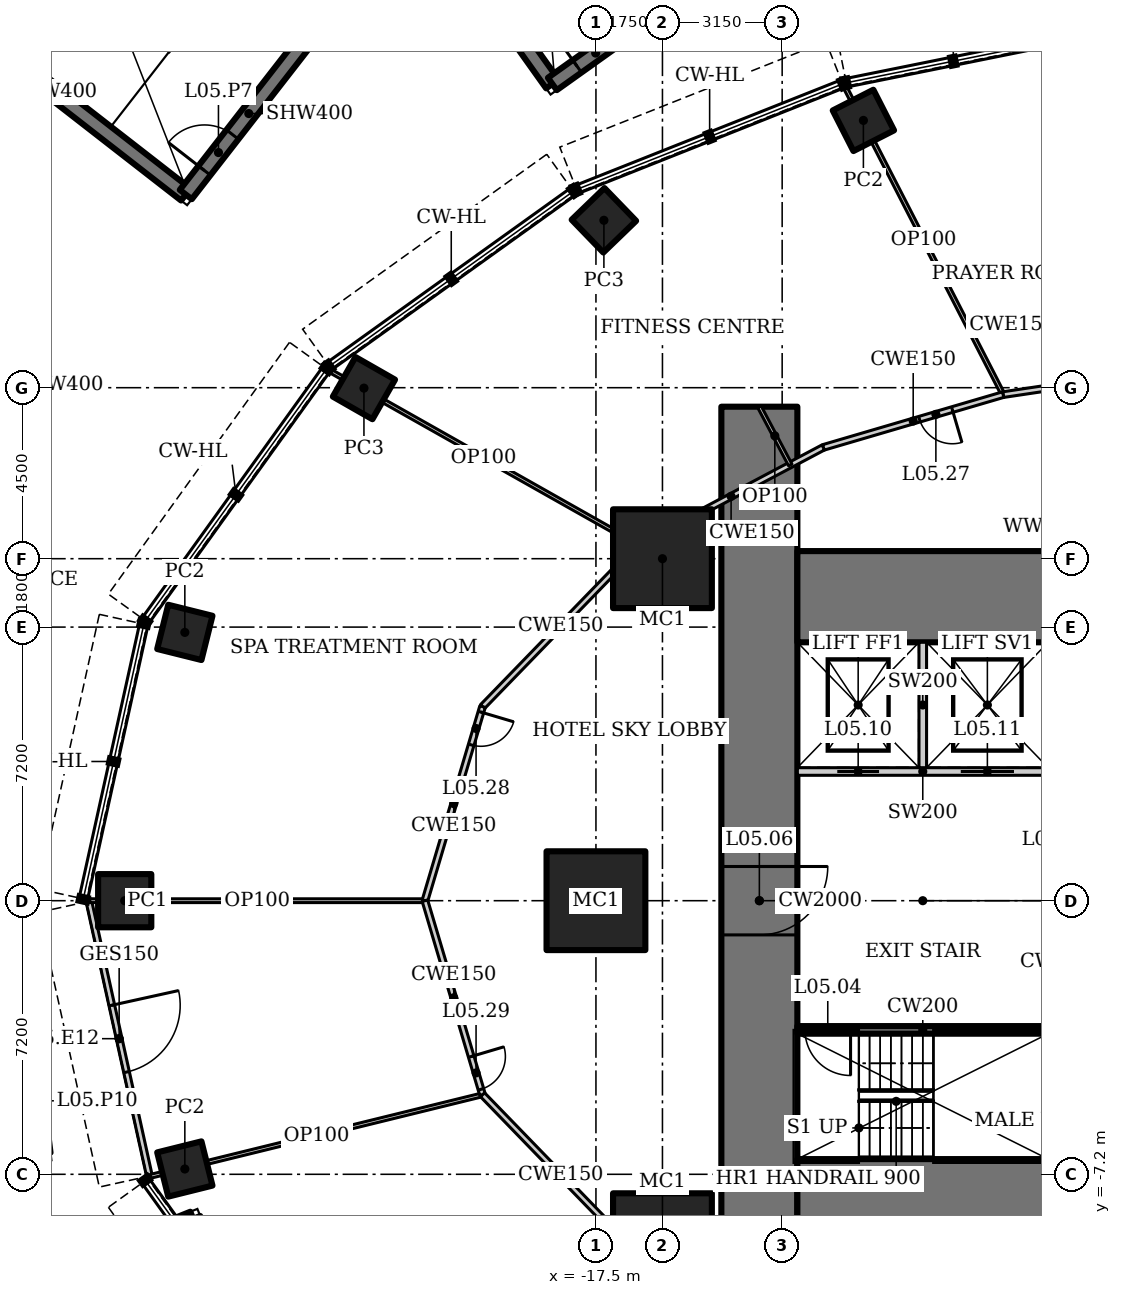
"""IFC4 building model, lengths in metres.
Left out: names, types, materials, properties, quantities, classifications, styles, units other than length and angle.
Written with IfcOpenShell. Run it as: python <this file> out.ifc"""

import sys

from ifc_helpers import new_model, si_unit, direction, frame, frame_2d, origin, origin_2d, place, context, subcontext, project, spatial, rectangle, hollow_rectangle, extrude, element, fill, save


model = new_model("IFC4")
c1 = context("Model", 3, precision=1e-05, world=origin(), true_north=direction((0.0, 1.0)))
c2 = subcontext(c1, "Body", "Model", "MODEL_VIEW")
j1 = project(units=[si_unit("LENGTHUNIT", "METRE"), si_unit("PLANEANGLEUNIT", "RADIAN")], contexts=[c1])
p1 = place(None, origin())
s1 = spatial("IfcSite", under=j1, at=p1, CompositionType="ELEMENT")
p2 = place(p1, origin())
s2 = spatial("IfcBuilding", under=s1, at=p2, CompositionType="ELEMENT")
p3 = place(p2, frame((0.0, 0.0, 32.0)))
s3 = spatial("IfcBuildingStorey", under=s2, at=p3, CompositionType="ELEMENT", Elevation=32.0)
for number, where, z_axis, x_axis in (
    (1, (-15.75, 9.0, 0.0), (0.0, 0.0, 1.0), (1.0, 0.0, 0.0)),
    (2, (-17.5, 0.0, 0.0), (0.0, 0.0, 1.0), (1.0, 0.0, 0.0)),
    (3, (-15.75, -9.0, 0.0), (0.0, 0.0, 1.0), (1.0, 0.0, 0.0)),
):
    element("IfcColumn", number, at=place(p3, frame(where, z_axis=z_axis, x_axis=x_axis)), inside=s3, PredefinedType="COLUMN", context=c2, shape_type="SweptSolid", body=[
        extrude(hollow_rectangle(XDim=2.6, YDim=2.6, WallThickness=0.13, at=origin_2d()), origin(), (0.0, 0.0, 1.0), 5.0),
    ])
p4 = place(p3, frame((-10.463, 20.534, 0.0), z_axis=(0.0, 0.0, 1.0), x_axis=(0.891006524188, 0.45399049974, 0.0)))
e4 = element("IfcColumn", 4, at=p4, inside=s3, PredefinedType="COLUMN", context=c2, shape_type="SweptSolid", body=[
    extrude(hollow_rectangle(XDim=1.2, YDim=1.2, WallThickness=0.1, at=origin_2d()), origin(), (0.0, 0.0, 1.0), 5.0),
])
for number, where, z_axis, x_axis in (
    (5, (-17.291, 17.905, 0.0), (0.0, 0.0, 1.0), (0.719, 0.695, 0.0)),
    (6, (-23.605, 13.489, 0.0), (0.0, 0.0, 1.0), (0.496, 0.868, 0.0)),
):
    element("IfcColumn", number, at=place(p3, frame(where, z_axis=z_axis, x_axis=x_axis)), inside=s3, PredefinedType="COLUMN", context=c2, shape_type="SweptSolid", body=[
        extrude(hollow_rectangle(XDim=1.2, YDim=1.2, WallThickness=0.12, at=origin_2d()), origin(), (0.0, 0.0, 1.0), 5.0),
    ])
p5 = place(p3, frame((-28.318, 7.06, 0.0), z_axis=(0.0, 0.0, 1.0), x_axis=(0.2419218956, 0.970295726276, 0.0)))
e7 = element("IfcColumn", 7, at=p5, inside=s3, PredefinedType="COLUMN", context=c2, shape_type="SweptSolid", body=[
    extrude(hollow_rectangle(XDim=1.2, YDim=1.2, WallThickness=0.1, at=origin_2d()), origin(), (0.0, 0.0, 1.0), 5.0),
])
p6 = place(p3, frame((-29.9, 0.0, 0.0), z_axis=(0.0, 0.0, 1.0), x_axis=(1.0, 0.0, 0.0)))
e8 = element("IfcColumn", 8, at=p6, inside=s3, PredefinedType="COLUMN", context=c2, shape_type="SweptSolid", body=[
    extrude(hollow_rectangle(XDim=1.4, YDim=1.4, WallThickness=0.1, at=origin_2d()), origin(), (0.0, 0.0, 1.0), 5.0),
])
p7 = place(p3, frame((-28.318, -7.06, 0.0), z_axis=(0.0, 0.0, 1.0), x_axis=(0.970295726276, 0.2419218956, 0.0)))
e9 = element("IfcColumn", 9, at=p7, inside=s3, PredefinedType="COLUMN", context=c2, shape_type="SweptSolid", body=[
    extrude(hollow_rectangle(XDim=1.2, YDim=1.2, WallThickness=0.1, at=origin_2d()), origin(), (0.0, 0.0, 1.0), 5.0),
])
p8 = place(p3, frame((-13.2, 13.0, 0.0), z_axis=(0.0, 0.0, 1.0), x_axis=(0.0, -1.0, 0.0)))
e10 = element("IfcWall", 10, at=p8, inside=s3, PredefinedType="SHEAR", context=c2, shape_type="SweptSolid", body=[
    extrude(rectangle(XDim=26.0, YDim=2.0, at=frame_2d((13.0, 0.0))), origin(), (0.0, 0.0, 1.0), 5.0),
])
p9 = place(p8, frame((12.1, 0.0, 0.0)))
e11 = element("IfcOpeningElement", 11, at=p9, cuts=e10, PredefinedType="OPENING", context=c2, shape_type="SweptSolid", body=[
    extrude(rectangle(XDim=1.8, YDim=2.1, at=frame_2d((0.9, 1.05))), frame((0.0, 1.01, 0.0), z_axis=(0.0, -1.0, 0.0), x_axis=(1.0, 0.0, 0.0)), (0.0, 0.0, 1.0), 2.02),
])
for number, where, z_axis, x_axis in (
    (12, (-12.2, -8.0, 0.0), (0.0, 0.0, 1.0), (1.0, 0.0, 0.0)),
    (13, (12.2, 8.0, 0.0), (0.0, 0.0, 1.0), (-1.0, 0.0, 0.0)),
):
    element("IfcWall", number, at=place(p3, frame(where, z_axis=z_axis, x_axis=x_axis)), inside=s3, PredefinedType="SHEAR", context=c2, shape_type="SweptSolid", body=[
        extrude(rectangle(XDim=24.4, YDim=2.4, at=frame_2d((12.2, 0.0))), origin(), (0.0, 0.0, 1.0), 5.0),
    ])
p10 = place(p3, frame((-5.6, -3.4, 0.0), z_axis=(0.0, 0.0, 1.0), x_axis=(-1.0, 0.0, 0.0)))
e14 = element("IfcWall", 14, at=p10, inside=s3, PredefinedType="SHEAR", context=c2, shape_type="SweptSolid", body=[
    extrude(rectangle(XDim=6.6, YDim=0.2, at=frame_2d((3.3, 0.0))), origin(), (0.0, 0.0, 1.0), 5.0),
])
p11 = place(p10, frame((5.2, 0.0, 0.0)))
e15 = element("IfcOpeningElement", 15, at=p11, cuts=e14, PredefinedType="OPENING", context=c2, shape_type="SweptSolid", body=[
    extrude(rectangle(XDim=1.2, YDim=2.1, at=frame_2d((0.6, 1.05))), frame((0.0, 0.11, 0.0), z_axis=(0.0, -1.0, 0.0), x_axis=(1.0, 0.0, 0.0)), (0.0, 0.0, 1.0), 0.22),
])
p12 = place(p3, frame((-12.2, 3.4, 0.0), z_axis=(0.0, 0.0, 1.0), x_axis=(1.0, 0.0, 0.0)))
e16 = element("IfcWall", 16, at=p12, inside=s3, PredefinedType="SOLIDWALL", context=c2, shape_type="SweptSolid", body=[
    extrude(rectangle(XDim=6.6, YDim=0.2, at=frame_2d((3.3, 0.0))), origin(), (0.0, 0.0, 1.0), 5.0),
])
p13 = place(p12, frame((1.05, 0.0, 0.0)))
e17 = element("IfcOpeningElement", 17, at=p13, cuts=e16, PredefinedType="OPENING", context=c2, shape_type="SweptSolid", body=[
    extrude(rectangle(XDim=1.1, YDim=2.2, at=frame_2d((0.55, 1.1))), frame((0.0, 0.11, 0.0), z_axis=(0.0, -1.0, 0.0), x_axis=(1.0, 0.0, 0.0)), (0.0, 0.0, 1.0), 0.22),
])
p14 = place(p12, frame((4.3, 0.0, 0.0)))
e18 = element("IfcOpeningElement", 18, at=p14, cuts=e16, PredefinedType="OPENING", context=c2, shape_type="SweptSolid", body=[
    extrude(rectangle(XDim=1.4, YDim=2.2, at=frame_2d((0.7, 1.1))), frame((0.0, 0.11, 0.0), z_axis=(0.0, -1.0, 0.0), x_axis=(1.0, 0.0, 0.0)), (0.0, 0.0, 1.0), 0.22),
])
p15 = place(p3, frame((-8.9, 3.5, 0.0), z_axis=(0.0, 0.0, 1.0), x_axis=(0.0, 1.0, 0.0)))
e19 = element("IfcWall", 19, at=p15, inside=s3, PredefinedType="SOLIDWALL", context=c2, shape_type="SweptSolid", body=[
    extrude(rectangle(XDim=3.3, YDim=0.2, at=frame_2d((1.65, 0.0))), origin(), (0.0, 0.0, 1.0), 5.0),
])
p16 = place(p3, frame((-30.854, 0.032, 0.0), z_axis=(0.0, 0.0, 1.0), x_axis=(0.215234867549, -0.976562313317, 0.0)))
e20 = element("IfcWall", 20, at=p16, inside=s3, PredefinedType="ELEMENTEDWALL", context=c2, shape_type="SweptSolid", body=[
    extrude(rectangle(XDim=7.502, YDim=0.15, at=frame_2d((3.751, 0.0))), origin(), (0.0, 0.0, 1.0), 4.85),
])
p17 = place(p16, frame((2.851, 0.0, 0.0)))
e21 = element("IfcOpeningElement", 21, at=p17, cuts=e20, PredefinedType="OPENING", context=c2, shape_type="SweptSolid", body=[
    extrude(rectangle(XDim=1.8, YDim=2.4, at=frame_2d((0.9, 1.2))), frame((0.0, 0.085, 0.0), z_axis=(0.0, -1.0, 0.0), x_axis=(1.0, 0.0, 0.0)), (0.0, 0.0, 1.0), 0.17),
])
p18 = place(p3, frame((-10.967, 21.453, 0.0), z_axis=(0.0, 0.0, 1.0), x_axis=(0.457125463925, -0.889402220726, 0.0)))
e22 = element("IfcWall", 22, at=p18, inside=s3, PredefinedType="PARTITIONING", context=c2, shape_type="SweptSolid", body=[
    extrude(rectangle(XDim=9.147, YDim=0.1, at=frame_2d((4.574, 0.0))), origin(), (0.0, 0.0, 1.0), 3.928),
])
p19 = place(p3, frame((-24.54, 13.968, 0.0), z_axis=(0.0, 0.0, 1.0), x_axis=(0.870737709049, -0.491747742283, 0.0)))
e23 = element("IfcWall", 23, at=p19, inside=s3, PredefinedType="PARTITIONING", context=c2, shape_type="SweptSolid", body=[
    extrude(rectangle(XDim=9.384, YDim=0.1, at=frame_2d((4.692, 0.0))), origin(), (0.0, 0.0, 1.0), 4.093),
])
p20 = place(p3, frame((-30.821, 0.0, 0.0), z_axis=(0.0, 0.0, 1.0), x_axis=(1.0, 0.0, 0.0)))
e24 = element("IfcWall", 24, at=p20, inside=s3, PredefinedType="PARTITIONING", context=c2, shape_type="SweptSolid", body=[
    extrude(rectangle(XDim=8.821, YDim=0.1, at=frame_2d((4.41, 0.0))), origin(), (0.0, 0.0, 1.0), 3.928),
])
p21 = place(p3, frame((-29.222, -7.254, 0.0), z_axis=(0.0, 0.0, 1.0), x_axis=(0.971128703136, 0.238556160989, 0.0)))
e25 = element("IfcWall", 25, at=p21, inside=s3, PredefinedType="PARTITIONING", context=c2, shape_type="SweptSolid", body=[
    extrude(rectangle(XDim=8.998, YDim=0.1, at=frame_2d((4.499, 0.0))), origin(), (0.0, 0.0, 1.0), 3.732),
])
p22 = place(p3, frame((-3.198, 13.851, 0.0), z_axis=(0.0, 0.0, 1.0), x_axis=(-0.989107488999, -0.14719502439, 0.0)))
e26 = element("IfcWall", 26, at=p22, inside=s3, PredefinedType="PARTITIONING", context=c2, shape_type="SweptSolid", body=[
    extrude(rectangle(XDim=3.627, YDim=0.15, at=frame_2d((1.814, 0.0))), origin(), (0.0, 0.0, 1.0), 4.85),
])
p23 = place(p22, frame((0.15, 0.0, 0.0)))
e27 = element("IfcOpeningElement", 27, at=p23, cuts=e26, PredefinedType="OPENING", context=c2, shape_type="SweptSolid", body=[
    extrude(rectangle(XDim=0.9, YDim=2.1, at=frame_2d((0.45, 1.05))), frame((0.0, 0.085, 0.0), z_axis=(0.0, -1.0, 0.0), x_axis=(1.0, 0.0, 0.0)), (0.0, 0.0, 1.0), 0.17),
])
p24 = place(p3, frame((-6.786, 13.317, 0.0), z_axis=(0.0, 0.0, 1.0), x_axis=(-0.959496227294, -0.281721475589, 0.0)))
e28 = element("IfcWall", 28, at=p24, inside=s3, PredefinedType="PARTITIONING", context=c2, shape_type="SweptSolid", body=[
    extrude(rectangle(XDim=4.933, YDim=0.15, at=frame_2d((2.466, 0.0))), origin(), (0.0, 0.0, 1.0), 4.85),
])
p25 = place(p24, frame((1.394, 0.0, 0.0)))
e29 = element("IfcOpeningElement", 29, at=p25, cuts=e28, PredefinedType="OPENING", context=c2, shape_type="SweptSolid", body=[
    extrude(rectangle(XDim=0.9, YDim=2.1, at=frame_2d((0.45, 1.05))), frame((0.0, 0.085, 0.0), z_axis=(0.0, -1.0, 0.0), x_axis=(1.0, 0.0, 0.0)), (0.0, 0.0, 1.0), 0.17),
])
p26 = place(p3, frame((-11.519, 11.928, 0.0), z_axis=(0.0, 0.0, 1.0), x_axis=(-0.883334368785, -0.468743419071, 0.0)))
e30 = element("IfcWall", 30, at=p26, inside=s3, PredefinedType="PARTITIONING", context=c2, shape_type="SweptSolid", body=[
    extrude(rectangle(XDim=5.491, YDim=0.15, at=frame_2d((2.746, 0.0))), origin(), (0.0, 0.0, 1.0), 4.85),
])
p27 = place(p3, frame((-16.369, 9.354, 0.0), z_axis=(0.0, 0.0, 1.0), x_axis=(-0.695871090686, -0.71816671125, 0.0)))
e31 = element("IfcWall", 31, at=p27, inside=s3, PredefinedType="PARTITIONING", context=c2, shape_type="SweptSolid", body=[
    extrude(rectangle(XDim=5.913, YDim=0.15, at=frame_2d((2.957, 0.0))), origin(), (0.0, 0.0, 1.0), 4.85),
])
p28 = place(p3, frame((-20.484, 5.107, 0.0), z_axis=(0.0, 0.0, 1.0), x_axis=(-0.284584469409, -0.95865096869, 0.0)))
e32 = element("IfcWall", 32, at=p28, inside=s3, PredefinedType="PARTITIONING", context=c2, shape_type="SweptSolid", body=[
    extrude(rectangle(XDim=5.327, YDim=0.15, at=frame_2d((2.664, 0.0))), origin(), (0.0, 0.0, 1.0), 4.85),
])
p29 = place(p28, frame((0.15, 0.0, 0.0)))
e33 = element("IfcOpeningElement", 33, at=p29, cuts=e32, PredefinedType="OPENING", context=c2, shape_type="SweptSolid", body=[
    extrude(rectangle(XDim=0.9, YDim=2.1, at=frame_2d((0.45, 1.05))), frame((0.0, 0.085, 0.0), z_axis=(0.0, -1.0, 0.0), x_axis=(1.0, 0.0, 0.0)), (0.0, 0.0, 1.0), 0.17),
])
p30 = place(p3, frame((-22.0, 0.0, 0.0), z_axis=(0.0, 0.0, 1.0), x_axis=(0.284584469409, -0.95865096869, 0.0)))
e34 = element("IfcWall", 34, at=p30, inside=s3, PredefinedType="PARTITIONING", context=c2, shape_type="SweptSolid", body=[
    extrude(rectangle(XDim=5.327, YDim=0.15, at=frame_2d((2.664, 0.0))), origin(), (0.0, 0.0, 1.0), 4.85),
])
p31 = place(p30, frame((4.278, 0.0, 0.0)))
e35 = element("IfcOpeningElement", 35, at=p31, cuts=e34, PredefinedType="OPENING", context=c2, shape_type="SweptSolid", body=[
    extrude(rectangle(XDim=0.9, YDim=2.1, at=frame_2d((0.45, 1.05))), frame((0.0, 0.085, 0.0), z_axis=(0.0, -1.0, 0.0), x_axis=(1.0, 0.0, 0.0)), (0.0, 0.0, 1.0), 0.17),
])
p32 = place(p3, frame((-20.484, -5.107, 0.0), z_axis=(0.0, 0.0, 1.0), x_axis=(0.695871090686, -0.71816671125, 0.0)))
e36 = element("IfcWall", 36, at=p32, inside=s3, PredefinedType="PARTITIONING", context=c2, shape_type="SweptSolid", body=[
    extrude(rectangle(XDim=5.913, YDim=0.15, at=frame_2d((2.957, 0.0))), origin(), (0.0, 0.0, 1.0), 4.85),
])
p33 = place(p3, frame((-13.2, 13.0, 0.0), z_axis=(0.0, 0.0, 1.0), x_axis=(0.46874717052, -0.88333237806, 0.0)))
e37 = element("IfcWall", 37, at=p33, inside=s3, PredefinedType="PARTITIONING", context=c2, shape_type="SweptSolid", body=[
    extrude(rectangle(XDim=1.735, YDim=0.1, at=frame_2d((0.868, 0.0))), origin(), (0.0, 0.0, 1.0), 4.85),
])
p34 = place(p3, frame((-23.757, 28.657, 0.0), z_axis=(0.0, 0.0, 1.0), x_axis=(0.580705313356, -0.814113836659, 0.0)))
e38 = element("IfcWall", 38, at=p34, inside=s3, PredefinedType="SHEAR", context=c2, shape_type="SweptSolid", body=[
    extrude(rectangle(XDim=8.8, YDim=0.4, at=frame_2d((4.4, 0.0))), origin(), (0.0, 0.0, 1.0), 3.5),
])
p35 = place(p3, frame((-18.647, 21.493, 0.0), z_axis=(0.0, 0.0, 1.0), x_axis=(0.814121252423, 0.580694916762, 0.0)))
e39 = element("IfcWall", 39, at=p35, inside=s3, PredefinedType="SHEAR", context=c2, shape_type="SweptSolid", body=[
    extrude(rectangle(XDim=5.4, YDim=0.4, at=frame_2d((2.7, 0.0))), origin(), (0.0, 0.0, 1.0), 3.5),
])
p36 = place(p35, frame((0.8, 0.0, 0.0)))
e40 = element("IfcOpeningElement", 40, at=p36, cuts=e39, PredefinedType="OPENING", context=c2, shape_type="SweptSolid", body=[
    extrude(rectangle(XDim=1.2, YDim=2.1, at=frame_2d((0.6, 1.05))), frame((0.0, 0.21, 0.0), z_axis=(0.0, -1.0, 0.0), x_axis=(1.0, 0.0, 0.0)), (0.0, 0.0, 1.0), 0.42),
])
p37 = place(p3, frame((-35.239, 23.985, 0.0), z_axis=(0.0, 0.0, 1.0), x_axis=(0.78938060008, -0.613904119726, 0.0)))
e41 = element("IfcWall", 41, at=p37, inside=s3, PredefinedType="SHEAR", context=c2, shape_type="SweptSolid", body=[
    extrude(rectangle(XDim=8.8, YDim=0.4, at=frame_2d((4.4, 0.0))), origin(), (0.0, 0.0, 1.0), 3.5),
])
p38 = place(p3, frame((-28.293, 18.583, 0.0), z_axis=(0.0, 0.0, 1.0), x_axis=(0.613912443548, 0.789374126544, 0.0)))
e42 = element("IfcWall", 42, at=p38, inside=s3, PredefinedType="SHEAR", context=c2, shape_type="SweptSolid", body=[
    extrude(rectangle(XDim=5.4, YDim=0.4, at=frame_2d((2.7, 0.0))), origin(), (0.0, 0.0, 1.0), 3.5),
])
p39 = place(p38, frame((0.8, 0.0, 0.0)))
e43 = element("IfcOpeningElement", 43, at=p39, cuts=e42, PredefinedType="OPENING", context=c2, shape_type="SweptSolid", body=[
    extrude(rectangle(XDim=1.2, YDim=2.1, at=frame_2d((0.6, 1.05))), frame((0.0, 0.21, 0.0), z_axis=(0.0, -1.0, 0.0), x_axis=(1.0, 0.0, 0.0)), (0.0, 0.0, 1.0), 0.42),
])
p40 = place(p3, frame((-28.099, -8.371, 0.0), z_axis=(0.0, 0.0, 1.0), x_axis=(-0.92801678004, -0.372538395288, 0.0)))
e44 = element("IfcWall", 44, at=p40, inside=s3, PredefinedType="SHEAR", context=c2, shape_type="SweptSolid", body=[
    extrude(rectangle(XDim=8.8, YDim=0.4, at=frame_2d((4.4, 0.0))), origin(), (0.0, 0.0, 1.0), 3.5),
])
p41 = place(p17, origin())
e45 = element("IfcDoor", 45, at=p41, inside=s3, OperationType="DOUBLE_DOOR_DOUBLE_SWING", PredefinedType="DOOR", context=c2, shape_type="SweptSolid", body=[
    extrude(rectangle(XDim=1.8, YDim=2.4, at=frame_2d((0.9, 1.2))), frame((0.0, 0.025, 0.0), z_axis=(0.0, -1.0, 0.0), x_axis=(1.0, 0.0, 0.0)), (0.0, 0.0, 1.0), 0.05),
])
fill(e21, e45)
p42 = place(p11, origin())
e46 = element("IfcDoor", 46, at=p42, inside=s3, OperationType="SINGLE_SWING_RIGHT", PredefinedType="DOOR", context=c2, shape_type="SweptSolid", body=[
    extrude(rectangle(XDim=1.2, YDim=2.1, at=frame_2d((0.6, 1.05))), frame((0.0, 0.025, 0.0), z_axis=(0.0, -1.0, 0.0), x_axis=(1.0, 0.0, 0.0)), (0.0, 0.0, 1.0), 0.05),
])
fill(e15, e46)
p43 = place(p9, origin())
e47 = element("IfcDoor", 47, at=p43, inside=s3, OperationType="DOUBLE_DOOR_DOUBLE_SWING", PredefinedType="DOOR", context=c2, shape_type="SweptSolid", body=[
    extrude(rectangle(XDim=1.8, YDim=2.1, at=frame_2d((0.9, 1.05))), frame((0.0, 0.025, 0.0), z_axis=(0.0, -1.0, 0.0), x_axis=(1.0, 0.0, 0.0)), (0.0, 0.0, 1.0), 0.05),
])
fill(e11, e47)
p44 = place(p13, origin())
e48 = element("IfcDoor", 48, at=p44, inside=s3, OperationType="DOUBLE_DOOR_SLIDING", PredefinedType="DOOR", context=c2, shape_type="SweptSolid", body=[
    extrude(rectangle(XDim=1.1, YDim=2.2, at=frame_2d((0.55, 1.1))), frame((0.0, 0.025, 0.0), z_axis=(0.0, -1.0, 0.0), x_axis=(1.0, 0.0, 0.0)), (0.0, 0.0, 1.0), 0.05),
])
fill(e17, e48)
p45 = place(p14, origin())
e49 = element("IfcDoor", 49, at=p45, inside=s3, OperationType="DOUBLE_DOOR_SLIDING", PredefinedType="DOOR", context=c2, shape_type="SweptSolid", body=[
    extrude(rectangle(XDim=1.4, YDim=2.2, at=frame_2d((0.7, 1.1))), frame((0.0, 0.025, 0.0), z_axis=(0.0, -1.0, 0.0), x_axis=(1.0, 0.0, 0.0)), (0.0, 0.0, 1.0), 0.05),
])
fill(e18, e49)
p46 = place(p25, origin())
e50 = element("IfcDoor", 50, at=p46, inside=s3, OperationType="SINGLE_SWING_LEFT", PredefinedType="DOOR", context=c2, shape_type="SweptSolid", body=[
    extrude(rectangle(XDim=0.9, YDim=2.1, at=frame_2d((0.45, 1.05))), frame((0.0, 0.025, 0.0), z_axis=(0.0, -1.0, 0.0), x_axis=(1.0, 0.0, 0.0)), (0.0, 0.0, 1.0), 0.05),
])
fill(e29, e50)
p47 = place(p29, origin())
e51 = element("IfcDoor", 51, at=p47, inside=s3, OperationType="SINGLE_SWING_LEFT", PredefinedType="DOOR", context=c2, shape_type="SweptSolid", body=[
    extrude(rectangle(XDim=0.9, YDim=2.1, at=frame_2d((0.45, 1.05))), frame((0.0, 0.025, 0.0), z_axis=(0.0, -1.0, 0.0), x_axis=(1.0, 0.0, 0.0)), (0.0, 0.0, 1.0), 0.05),
])
fill(e33, e51)
p48 = place(p31, origin())
e52 = element("IfcDoor", 52, at=p48, inside=s3, OperationType="SINGLE_SWING_LEFT", PredefinedType="DOOR", context=c2, shape_type="SweptSolid", body=[
    extrude(rectangle(XDim=0.9, YDim=2.1, at=frame_2d((0.45, 1.05))), frame((0.0, 0.025, 0.0), z_axis=(0.0, -1.0, 0.0), x_axis=(1.0, 0.0, 0.0)), (0.0, 0.0, 1.0), 0.05),
])
fill(e35, e52)
p49 = place(p36, origin())
e53 = element("IfcDoor", 53, at=p49, inside=s3, OperationType="SINGLE_SWING_RIGHT", PredefinedType="DOOR", context=c2, shape_type="SweptSolid", body=[
    extrude(rectangle(XDim=1.2, YDim=2.1, at=frame_2d((0.6, 1.05))), frame((0.0, 0.025, 0.0), z_axis=(0.0, -1.0, 0.0), x_axis=(1.0, 0.0, 0.0)), (0.0, 0.0, 1.0), 0.05),
])
fill(e40, e53)
p50 = place(p39, origin())
e54 = element("IfcDoor", 54, at=p50, inside=s3, OperationType="SINGLE_SWING_RIGHT", PredefinedType="DOOR", context=c2, shape_type="SweptSolid", body=[
    extrude(rectangle(XDim=1.2, YDim=2.1, at=frame_2d((0.6, 1.05))), frame((0.0, 0.025, 0.0), z_axis=(0.0, -1.0, 0.0), x_axis=(1.0, 0.0, 0.0)), (0.0, 0.0, 1.0), 0.05),
])
fill(e43, e54)
save(model, sys.argv[1])
